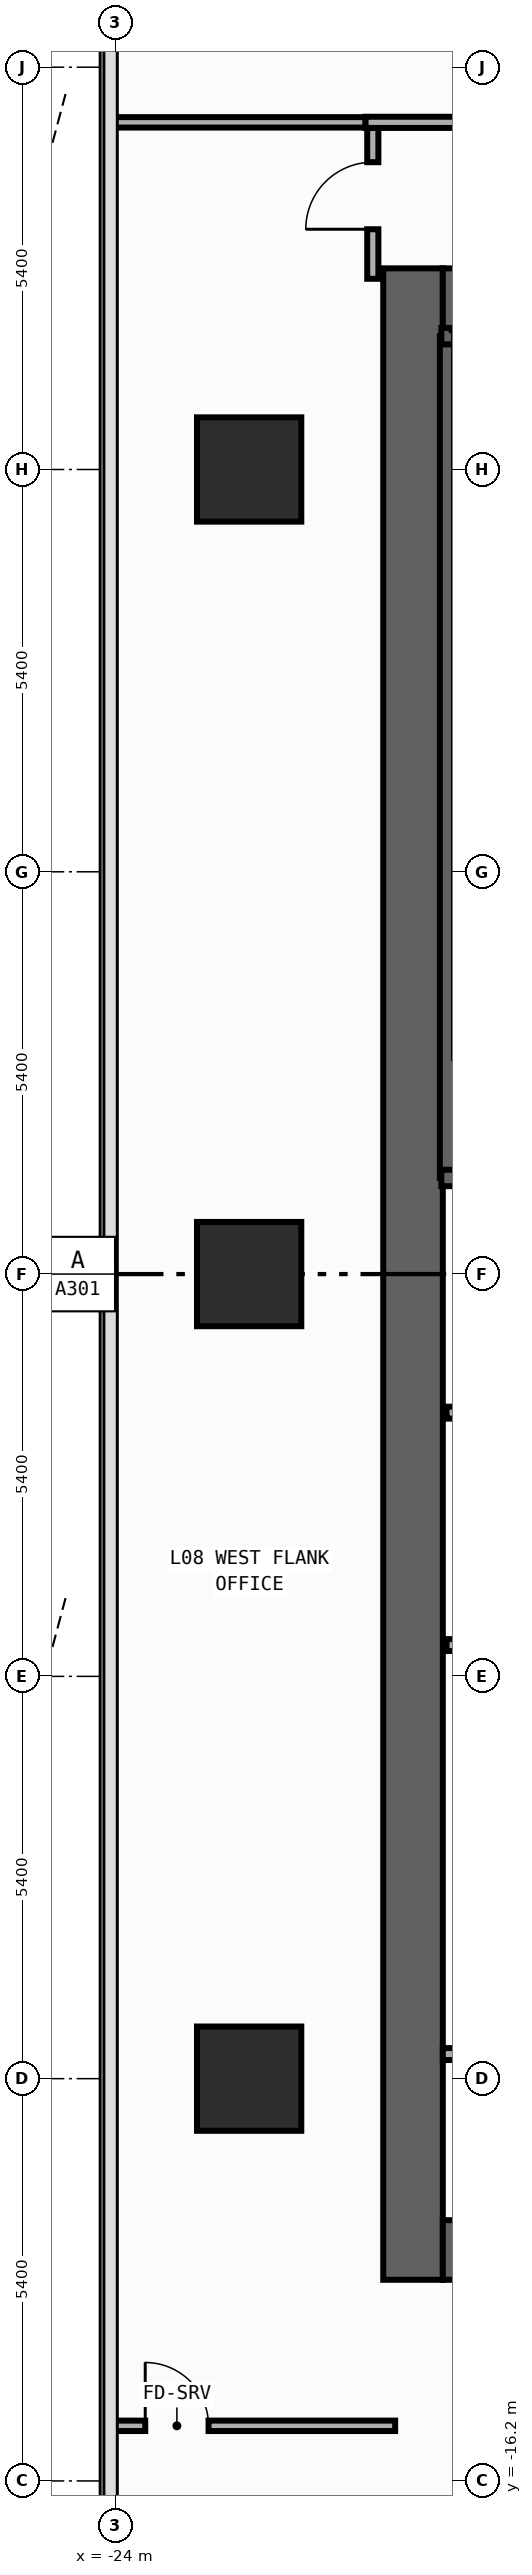
"""IFC4 building model, lengths in metres.
Left out: names, types, materials, properties, quantities, classifications, styles, units other than length and angle.
Written with IfcOpenShell. Run it as: python <this file> out.ifc"""

import sys

from ifc_helpers import new_model, si_unit, direction, frame, frame_2d, origin, origin_2d, place, context, subcontext, project, spatial, rectangle, extrude, element, fill, save


model = new_model("IFC4")
c1 = context("Model", 3, precision=1e-05, world=origin(), true_north=direction((0.0, 1.0)))
c2 = subcontext(c1, "Body", "Model", "MODEL_VIEW")
j1 = project(units=[si_unit("LENGTHUNIT", "METRE"), si_unit("PLANEANGLEUNIT", "RADIAN")], contexts=[c1])
p1 = place(None, origin())
s1 = spatial("IfcSite", under=j1, at=p1, CompositionType="ELEMENT")
p2 = place(p1, origin())
s2 = spatial("IfcBuilding", under=s1, at=p2, CompositionType="ELEMENT")
p3 = place(p2, frame((0.0, 0.0, 34.4)))
s3 = spatial("IfcBuildingStorey", under=s2, at=p3, CompositionType="ELEMENT", Elevation=34.4)
p4 = place(p3, frame((-20.0, -13.5, 0.0), z_axis=(0.0, 0.0, 1.0), x_axis=(0.0, 1.0, 0.0)))
e1 = element("IfcWall", 1, at=p4, inside=s3, PredefinedType="SHEAR", context=c2, shape_type="SweptSolid", body=[
    extrude(rectangle(XDim=27.0, YDim=0.8, at=frame_2d((13.5, 0.0))), origin(), (0.0, 0.0, 1.0), 3.94),
])
for number, where, z_axis, x_axis in (
    (2, (-19.6, -13.1, 0.0), (0.0, 0.0, 1.0), (1.0, 0.0, 0.0)),
    (3, (-19.6, 13.1, 0.0), (0.0, 0.0, 1.0), (1.0, 0.0, 0.0)),
):
    element("IfcWall", number, at=place(p3, frame(where, z_axis=z_axis, x_axis=x_axis)), inside=s3, PredefinedType="SHEAR", context=c2, shape_type="SweptSolid", body=[
        extrude(rectangle(XDim=6.8, YDim=0.8, at=frame_2d((3.4, 0.0))), origin(), (0.0, 0.0, 1.0), 3.94),
    ])
p5 = place(p3, frame((-19.53, 1.29, 0.0), z_axis=(0.0, 0.0, 1.0), x_axis=(0.0, 1.0, 0.0)))
e4 = element("IfcWall", 4, at=p5, inside=s3, PredefinedType="SHEAR", context=c2, shape_type="SweptSolid", body=[
    extrude(rectangle(XDim=11.3, YDim=0.22, at=frame_2d((5.65, 0.0))), origin(), (0.0, 0.0, 1.0), 3.94),
])
p6 = place(p3, frame((-19.62, 12.59, 0.0), z_axis=(0.0, 0.0, 1.0), x_axis=(1.0, 0.0, 0.0)))
e5 = element("IfcWall", 5, at=p6, inside=s3, PredefinedType="SHEAR", context=c2, shape_type="SweptSolid", body=[
    extrude(rectangle(XDim=3.915, YDim=0.22, at=frame_2d((1.958, 0.0))), origin(), (0.0, 0.0, 1.0), 3.94),
])
p7 = place(p3, frame((-19.62, 1.29, 0.0), z_axis=(0.0, 0.0, 1.0), x_axis=(1.0, 0.0, 0.0)))
e6 = element("IfcWall", 6, at=p7, inside=s3, PredefinedType="SHEAR", context=c2, shape_type="SweptSolid", body=[
    extrude(rectangle(XDim=3.915, YDim=0.22, at=frame_2d((1.958, 0.0))), origin(), (0.0, 0.0, 1.0), 3.94),
])
p8 = place(p7, frame((1.08, 0.0, 0.0)))
e7 = element("IfcOpeningElement", 7, at=p8, cuts=e6, PredefinedType="OPENING", context=c2, shape_type="SweptSolid", body=[
    extrude(rectangle(XDim=1.1, YDim=2.2, at=frame_2d((0.55, 1.1))), frame((0.0, 0.12, 0.0), z_axis=(0.0, -1.0, 0.0), x_axis=(1.0, 0.0, 0.0)), (0.0, 0.0, 1.0), 0.24),
])
for number, where, z_axis, x_axis in (
    (8, (-22.2, -10.8, 0.0), (0.0, 0.0, 1.0), (1.0, 0.0, 0.0)),
    (9, (-22.2, 0.0, 0.0), (0.0, 0.0, 1.0), (1.0, 0.0, 0.0)),
    (10, (-22.2, 10.8, 0.0), (0.0, 0.0, 1.0), (1.0, 0.0, 0.0)),
):
    element("IfcColumn", number, at=place(p3, frame(where, z_axis=z_axis, x_axis=x_axis)), inside=s3, PredefinedType="COLUMN", context=c2, shape_type="SweptSolid", body=[
        extrude(rectangle(XDim=1.4, YDim=1.4, at=origin_2d()), origin(), (0.0, 0.0, 1.0), 4.2),
    ])
p9 = place(p3, frame((-19.55, -1.86, 0.0), z_axis=(0.0, 0.0, 1.0), x_axis=(1.0, 0.0, 0.0)))
e11 = element("IfcWall", 11, at=p9, inside=s3, PredefinedType="STANDARD", context=c2, shape_type="SweptSolid", body=[
    extrude(rectangle(XDim=3.8, YDim=0.16, at=frame_2d((1.9, 0.0))), origin(), (0.0, 0.0, 1.0), 3.94),
])
p10 = place(p9, frame((1.18, 0.0, 0.0)))
e12 = element("IfcOpeningElement", 12, at=p10, cuts=e11, PredefinedType="OPENING", context=c2, shape_type="SweptSolid", body=[
    extrude(rectangle(XDim=1.15, YDim=2.2, at=frame_2d((0.575, 1.1))), frame((0.0, 0.09, 0.0), z_axis=(0.0, -1.0, 0.0), x_axis=(1.0, 0.0, 0.0)), (0.0, 0.0, 1.0), 0.18),
])
p11 = place(p3, frame((-19.55, -4.98, 0.0), z_axis=(0.0, 0.0, 1.0), x_axis=(1.0, 0.0, 0.0)))
e13 = element("IfcWall", 13, at=p11, inside=s3, PredefinedType="STANDARD", context=c2, shape_type="SweptSolid", body=[
    extrude(rectangle(XDim=3.8, YDim=0.16, at=frame_2d((1.9, 0.0))), origin(), (0.0, 0.0, 1.0), 3.94),
])
p12 = place(p3, frame((-19.6, -10.47, 0.0), z_axis=(0.0, 0.0, 1.0), x_axis=(1.0, 0.0, 0.0)))
e14 = element("IfcWall", 14, at=p12, inside=s3, PredefinedType="PARTITIONING", context=c2, shape_type="SweptSolid", body=[
    extrude(rectangle(XDim=2.29, YDim=0.16, at=frame_2d((1.145, 0.0))), origin(), (0.0, 0.0, 1.0), 3.94),
])
p13 = place(p3, frame((-20.54, 13.36, 0.0), z_axis=(0.0, 0.0, 1.0), x_axis=(0.0, 1.0, 0.0)))
e15 = element("IfcWall", 15, at=p13, inside=s3, PredefinedType="PARTITIONING", context=c2, shape_type="SweptSolid", body=[
    extrude(rectangle(XDim=2.025, YDim=0.15, at=frame_2d((1.012, 0.0))), origin(), (0.0, 0.0, 1.0), 3.94),
])
p14 = place(p13, frame((0.665, 0.0, 0.0)))
e16 = element("IfcOpeningElement", 16, at=p14, cuts=e15, PredefinedType="OPENING", context=c2, shape_type="SweptSolid", body=[
    extrude(rectangle(XDim=0.9, YDim=2.15, at=frame_2d((0.45, 1.075))), frame((0.0, 0.085, 0.0), z_axis=(0.0, -1.0, 0.0), x_axis=(1.0, 0.0, 0.0)), (0.0, 0.0, 1.0), 0.17),
])
p15 = place(p3, frame((-20.64, 15.46, 0.0), z_axis=(0.0, 0.0, 1.0), x_axis=(1.0, 0.0, 0.0)))
e17 = element("IfcWall", 17, at=p15, inside=s3, PredefinedType="PARTITIONING", context=c2, shape_type="SweptSolid", body=[
    extrude(rectangle(XDim=8.65, YDim=0.15, at=frame_2d((4.325, 0.0))), origin(), (0.0, 0.0, 1.0), 3.94),
])
p16 = place(p15, frame((2.871, 0.0, 0.0)))
e18 = element("IfcOpeningElement", 18, at=p16, cuts=e17, PredefinedType="OPENING", context=c2, shape_type="SweptSolid", body=[
    extrude(rectangle(XDim=0.9, YDim=2.15, at=frame_2d((0.45, 1.075))), frame((0.0, 0.085, 0.0), z_axis=(0.0, -1.0, 0.0), x_axis=(1.0, 0.0, 0.0)), (0.0, 0.0, 1.0), 0.17),
])
p17 = place(p3, frame((-24.055, 15.46, 0.0), z_axis=(0.0, 0.0, 1.0), x_axis=(1.0, 0.0, 0.0)))
e19 = element("IfcWall", 19, at=p17, inside=s3, PredefinedType="PARTITIONING", context=c2, shape_type="SweptSolid", body=[
    extrude(rectangle(XDim=3.415, YDim=0.14, at=frame_2d((1.708, 0.0))), origin(), (0.0, 0.0, 1.0), 3.94),
])
p18 = place(p3, frame((-24.055, -15.46, 0.0), z_axis=(0.0, 0.0, 1.0), x_axis=(1.0, 0.0, 0.0)))
e20 = element("IfcWall", 20, at=p18, inside=s3, PredefinedType="PARTITIONING", context=c2, shape_type="SweptSolid", body=[
    extrude(rectangle(XDim=3.815, YDim=0.14, at=frame_2d((1.907, 0.0))), origin(), (0.0, 0.0, 1.0), 3.94),
])
p19 = place(p18, frame((0.46, 0.0, 0.0)))
e21 = element("IfcOpeningElement", 21, at=p19, cuts=e20, PredefinedType="OPENING", context=c2, shape_type="SweptSolid", body=[
    extrude(rectangle(XDim=0.85, YDim=2.1, at=frame_2d((0.425, 1.05))), frame((0.0, 0.08, 0.0), z_axis=(0.0, -1.0, 0.0), x_axis=(1.0, 0.0, 0.0)), (0.0, 0.0, 1.0), 0.16),
])
p20 = place(p14, origin())
e22 = element("IfcDoor", 22, at=p20, inside=s3, OperationType="SINGLE_SWING_LEFT", PredefinedType="DOOR", context=c2, shape_type="SweptSolid", body=[
    extrude(rectangle(XDim=0.9, YDim=2.15, at=frame_2d((0.45, 1.075))), frame((0.0, 0.025, 0.0), z_axis=(0.0, -1.0, 0.0), x_axis=(1.0, 0.0, 0.0)), (0.0, 0.0, 1.0), 0.05),
])
fill(e16, e22)
p21 = place(p19, origin())
e23 = element("IfcDoor", 23, at=p21, inside=s3, OperationType="SINGLE_SWING_LEFT", PredefinedType="DOOR", context=c2, shape_type="SweptSolid", body=[
    extrude(rectangle(XDim=0.85, YDim=2.1, at=frame_2d((0.425, 1.05))), frame((0.0, 0.025, 0.0), z_axis=(0.0, -1.0, 0.0), x_axis=(1.0, 0.0, 0.0)), (0.0, 0.0, 1.0), 0.05),
])
fill(e21, e23)
save(model, sys.argv[1])
